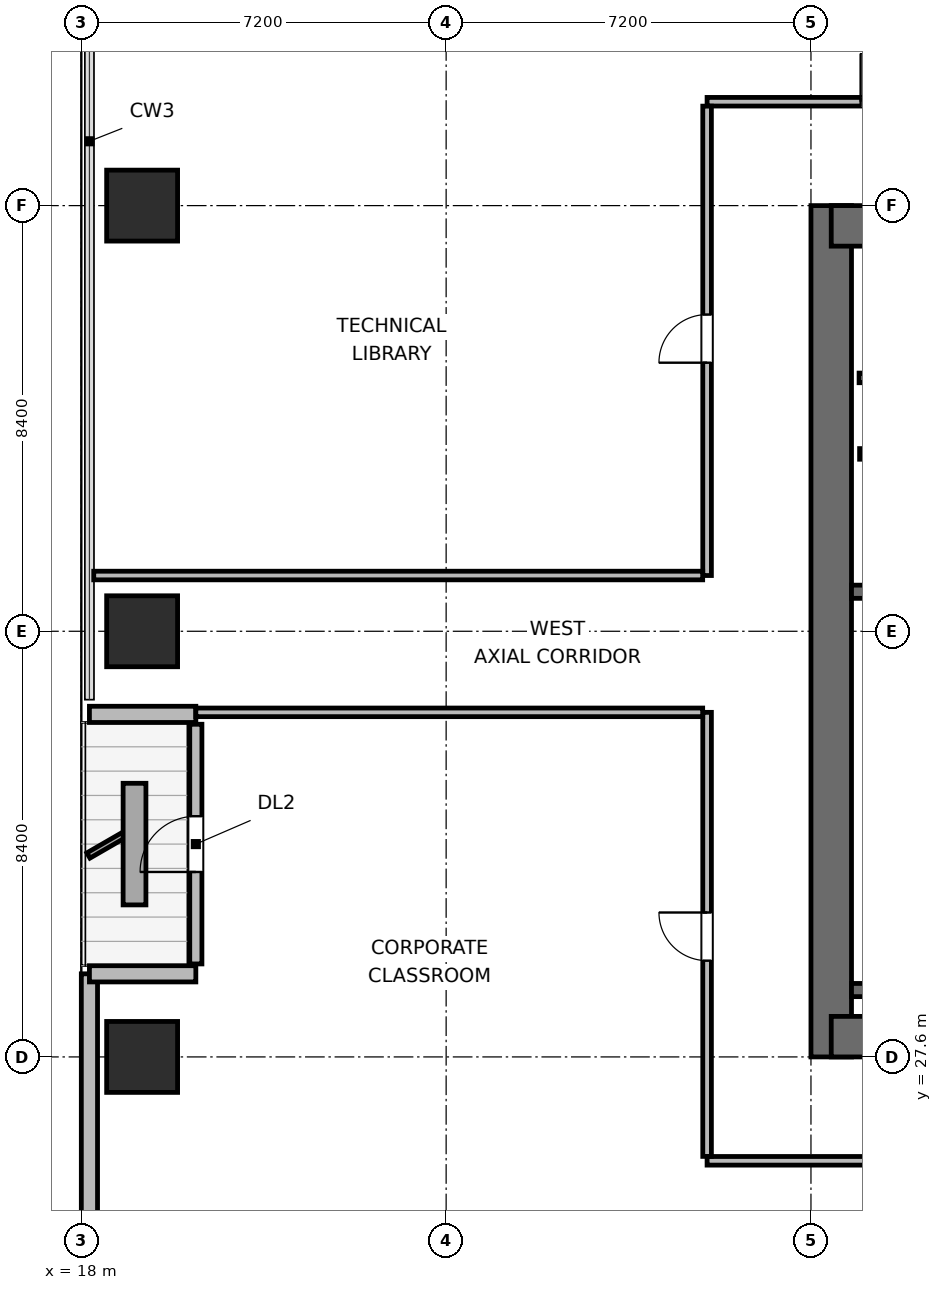
"""IFC4 building model, lengths in metres.
Left out: names, types, materials, properties, quantities, classifications, styles, units other than length and angle.
Written with IfcOpenShell. Run it as: python <this file> out.ifc"""

import sys

from ifc_helpers import new_model, si_unit, direction, frame, frame_2d, origin, origin_2d, place, context, subcontext, project, spatial, rectangle, extrude, element, fill, save


model = new_model("IFC4")
c1 = context("Model", 3, precision=1e-05, world=origin(), true_north=direction((0.0, 1.0)))
c2 = subcontext(c1, "Body", "Model", "MODEL_VIEW")
j1 = project(units=[si_unit("LENGTHUNIT", "METRE"), si_unit("PLANEANGLEUNIT", "RADIAN")], contexts=[c1])
p1 = place(None, origin())
s1 = spatial("IfcSite", under=j1, at=p1, CompositionType="ELEMENT")
p2 = place(p1, origin())
s2 = spatial("IfcBuilding", under=s1, at=p2, CompositionType="ELEMENT")
p3 = place(p2, frame((0.0, 0.0, 133.8)))
s3 = spatial("IfcBuildingStorey", under=s2, at=p3, CompositionType="ELEMENT", Elevation=133.8)
p4 = place(p3, frame((32.8, 27.6, 0.0), z_axis=(0.0, 0.0, 1.0), x_axis=(0.0, 1.0, 0.0)))
e1 = element("IfcWall", 1, at=p4, inside=s3, PredefinedType="SHEAR", context=c2, shape_type="SweptSolid", body=[
    extrude(rectangle(XDim=16.8, YDim=0.8, at=frame_2d((8.4, 0.0))), origin(), (0.0, 0.0, 1.0), 3.9),
])
p5 = place(p3, frame((32.8, 28.0, 0.0), z_axis=(0.0, 0.0, 1.0), x_axis=(1.0, 0.0, 0.0)))
e2 = element("IfcWall", 2, at=p5, inside=s3, PredefinedType="SHEAR", context=c2, shape_type="SweptSolid", body=[
    extrude(rectangle(XDim=9.2, YDim=0.8, at=frame_2d((4.6, 0.0))), origin(), (0.0, 0.0, 1.0), 3.9),
])
p6 = place(p5, frame((4.975, 0.0, 0.0)))
e3 = element("IfcOpeningElement", 3, at=p6, cuts=e2, PredefinedType="OPENING", context=c2, shape_type="SweptSolid", body=[
    extrude(rectangle(XDim=1.05, YDim=2.04, at=frame_2d((0.525, 1.02))), frame((0.0, 0.41, 0.0), z_axis=(0.0, -1.0, 0.0), x_axis=(1.0, 0.0, 0.0)), (0.0, 0.0, 1.0), 0.82),
])
p7 = place(p3, frame((32.8, 44.0, 0.0), z_axis=(0.0, 0.0, 1.0), x_axis=(1.0, 0.0, 0.0)))
e4 = element("IfcWall", 4, at=p7, inside=s3, PredefinedType="SHEAR", context=c2, shape_type="SweptSolid", body=[
    extrude(rectangle(XDim=9.2, YDim=0.8, at=frame_2d((4.6, 0.0))), origin(), (0.0, 0.0, 1.0), 3.9),
])
p8 = place(p7, frame((0.975, 0.0, 0.0)))
e5 = element("IfcOpeningElement", 5, at=p8, cuts=e4, PredefinedType="OPENING", context=c2, shape_type="SweptSolid", body=[
    extrude(rectangle(XDim=0.95, YDim=2.04, at=frame_2d((0.475, 1.02))), frame((0.0, 0.41, 0.0), z_axis=(0.0, -1.0, 0.0), x_axis=(1.0, 0.0, 0.0)), (0.0, 0.0, 1.0), 0.82),
])
p9 = place(p7, frame((4.225, 0.0, 0.0)))
e6 = element("IfcOpeningElement", 6, at=p9, cuts=e4, PredefinedType="OPENING", context=c2, shape_type="SweptSolid", body=[
    extrude(rectangle(XDim=0.9, YDim=2.02, at=frame_2d((0.45, 1.01))), frame((0.0, 0.41, 0.0), z_axis=(0.0, -1.0, 0.0), x_axis=(1.0, 0.0, 0.0)), (0.0, 0.0, 1.0), 0.82),
])
p10 = place(p7, frame((7.125, 0.0, 0.0)))
e7 = element("IfcOpeningElement", 7, at=p10, cuts=e4, PredefinedType="OPENING", context=c2, shape_type="SweptSolid", body=[
    extrude(rectangle(XDim=0.9, YDim=2.02, at=frame_2d((0.45, 1.01))), frame((0.0, 0.41, 0.0), z_axis=(0.0, -1.0, 0.0), x_axis=(1.0, 0.0, 0.0)), (0.0, 0.0, 1.0), 0.82),
])
for number, where, z_axis, x_axis in (
    (8, (33.2, 28.92, 0.0), (0.0, 0.0, 1.0), (1.0, 0.0, 0.0)),
    (9, (33.2, 36.78, 0.0), (0.0, 0.0, 1.0), (1.0, 0.0, 0.0)),
):
    element("IfcWall", number, at=place(p3, frame(where, z_axis=z_axis, x_axis=x_axis)), inside=s3, PredefinedType="SHEAR", context=c2, shape_type="SweptSolid", body=[
        extrude(rectangle(XDim=3.91, YDim=0.26, at=frame_2d((1.955, 0.0))), origin(), (0.0, 0.0, 1.0), 3.9),
    ])
for number, where, z_axis, x_axis in (
    (10, (19.2, 27.6, 0.0), (0.0, 0.0, 1.0), (1.0, 0.0, 0.0)),
    (11, (19.2, 36.0, 0.0), (0.0, 0.0, 1.0), (1.0, 0.0, 0.0)),
    (12, (19.2, 44.4, 0.0), (0.0, 0.0, 1.0), (1.0, 0.0, 0.0)),
):
    element("IfcColumn", number, at=place(p3, frame(where, z_axis=z_axis, x_axis=x_axis)), inside=s3, PredefinedType="COLUMN", context=c2, shape_type="SweptSolid", body=[
        extrude(rectangle(XDim=1.4, YDim=1.4, at=origin_2d()), origin(), (0.0, 0.0, 1.0), 3.9),
    ])
p11 = place(p3, frame((18.16, 15.021, 0.0), z_axis=(0.0, 0.0, 1.0), x_axis=(0.0, 1.0, 0.0)))
e13 = element("IfcWall", 13, at=p11, inside=s3, PredefinedType="SOLIDWALL", context=c2, shape_type="SweptSolid", body=[
    extrude(rectangle(XDim=14.219, YDim=0.32, at=frame_2d((7.109, 0.0))), origin(), (0.0, 0.0, 1.0), 3.64),
])
p12 = place(p3, frame((18.16, 29.24, 0.0), z_axis=(0.0, 0.0, 1.0), x_axis=(1.0, 0.0, 0.0)))
e14 = element("IfcWall", 14, at=p12, inside=s3, PredefinedType="SOLIDWALL", context=c2, shape_type="SweptSolid", body=[
    extrude(rectangle(XDim=2.1, YDim=0.32, at=frame_2d((1.05, 0.0))), origin(), (0.0, 0.0, 1.0), 2.875),
])
p13 = place(p3, frame((20.26, 29.435, 0.0), z_axis=(0.0, 0.0, 1.0), x_axis=(0.0, 1.0, 0.0)))
e15 = element("IfcWall", 15, at=p13, inside=s3, PredefinedType="SOLIDWALL", context=c2, shape_type="SweptSolid", body=[
    extrude(rectangle(XDim=4.73, YDim=0.24, at=frame_2d((2.365, 0.0))), origin(), (0.0, 0.0, 1.0), 3.162),
])
p14 = place(p13, frame((1.815, 0.0, 0.0)))
e16 = element("IfcOpeningElement", 16, at=p14, cuts=e15, PredefinedType="OPENING", context=c2, shape_type="SweptSolid", body=[
    extrude(rectangle(XDim=1.1, YDim=2.04, at=frame_2d((0.55, 1.02))), frame((0.0, 0.13, 0.0), z_axis=(0.0, -1.0, 0.0), x_axis=(1.0, 0.0, 0.0)), (0.0, 0.0, 1.0), 0.26),
])
p15 = place(p3, frame((20.26, 34.36, 0.0), z_axis=(0.0, 0.0, 1.0), x_axis=(-1.0, 0.0, 0.0)))
e17 = element("IfcWall", 17, at=p15, inside=s3, PredefinedType="SOLIDWALL", context=c2, shape_type="SweptSolid", body=[
    extrude(rectangle(XDim=2.1, YDim=0.32, at=frame_2d((1.05, 0.0))), origin(), (0.0, 0.0, 1.0), 2.875),
])
p16 = place(p3, frame((33.35, 41.0, 0.0), z_axis=(0.0, 0.0, 1.0), x_axis=(1.0, 0.0, 0.0)))
e18 = element("IfcWall", 18, at=p16, inside=s3, PredefinedType="PLUMBINGWALL", context=c2, shape_type="SweptSolid", body=[
    extrude(rectangle(XDim=8.1, YDim=0.19, at=frame_2d((4.05, 0.0))), origin(), (0.0, 0.0, 1.0), 3.64),
])
p17 = place(p3, frame((33.36, 39.5, 0.0), z_axis=(0.0, 0.0, 1.0), x_axis=(1.0, 0.0, 0.0)))
e19 = element("IfcWall", 19, at=p17, inside=s3, PredefinedType="PARTITIONING", context=c2, shape_type="SweptSolid", body=[
    extrude(rectangle(XDim=1.86, YDim=0.21, at=frame_2d((0.93, 0.0))), origin(), (0.0, 0.0, 1.0), 3.64),
])
p18 = place(p3, frame((30.35, 25.55, 0.0), z_axis=(0.0, 0.0, 1.0), x_axis=(1.0, 0.0, 0.0)))
e20 = element("IfcWall", 20, at=p18, inside=s3, PredefinedType="PARTITIONING", context=c2, shape_type="SweptSolid", body=[
    extrude(rectangle(XDim=33.25, YDim=0.17, at=frame_2d((16.625, 0.0))), origin(), (0.0, 0.0, 1.0), 3.64),
])
p19 = place(p18, frame((3.21, 0.0, 0.0)))
e21 = element("IfcOpeningElement", 21, at=p19, cuts=e20, PredefinedType="OPENING", context=c2, shape_type="SweptSolid", body=[
    extrude(rectangle(XDim=0.95, YDim=2.04, at=frame_2d((0.475, 1.02))), frame((0.0, 0.095, 0.0), z_axis=(0.0, -1.0, 0.0), x_axis=(1.0, 0.0, 0.0)), (0.0, 0.0, 1.0), 0.19),
])
p20 = place(p18, frame((9.98, 0.0, 0.0)))
e22 = element("IfcOpeningElement", 22, at=p20, cuts=e20, PredefinedType="OPENING", context=c2, shape_type="SweptSolid", body=[
    extrude(rectangle(XDim=0.95, YDim=2.04, at=frame_2d((0.475, 1.02))), frame((0.0, 0.095, 0.0), z_axis=(0.0, -1.0, 0.0), x_axis=(1.0, 0.0, 0.0)), (0.0, 0.0, 1.0), 0.19),
])
p21 = place(p18, frame((16.15, 0.0, 0.0)))
e23 = element("IfcOpeningElement", 23, at=p21, cuts=e20, PredefinedType="OPENING", context=c2, shape_type="SweptSolid", body=[
    extrude(rectangle(XDim=0.95, YDim=2.04, at=frame_2d((0.475, 1.02))), frame((0.0, 0.095, 0.0), z_axis=(0.0, -1.0, 0.0), x_axis=(1.0, 0.0, 0.0)), (0.0, 0.0, 1.0), 0.19),
])
p22 = place(p18, frame((22.32, 0.0, 0.0)))
e24 = element("IfcOpeningElement", 24, at=p22, cuts=e20, PredefinedType="OPENING", context=c2, shape_type="SweptSolid", body=[
    extrude(rectangle(XDim=0.95, YDim=2.04, at=frame_2d((0.475, 1.02))), frame((0.0, 0.095, 0.0), z_axis=(0.0, -1.0, 0.0), x_axis=(1.0, 0.0, 0.0)), (0.0, 0.0, 1.0), 0.19),
])
p23 = place(p18, frame((29.09, 0.0, 0.0)))
e25 = element("IfcOpeningElement", 25, at=p23, cuts=e20, PredefinedType="OPENING", context=c2, shape_type="SweptSolid", body=[
    extrude(rectangle(XDim=0.95, YDim=2.04, at=frame_2d((0.475, 1.02))), frame((0.0, 0.095, 0.0), z_axis=(0.0, -1.0, 0.0), x_axis=(1.0, 0.0, 0.0)), (0.0, 0.0, 1.0), 0.19),
])
p24 = place(p3, frame((30.35, 46.45, 0.0), z_axis=(0.0, 0.0, 1.0), x_axis=(1.0, 0.0, 0.0)))
e26 = element("IfcWall", 26, at=p24, inside=s3, PredefinedType="PARTITIONING", context=c2, shape_type="SweptSolid", body=[
    extrude(rectangle(XDim=33.25, YDim=0.17, at=frame_2d((16.625, 0.0))), origin(), (0.0, 0.0, 1.0), 3.64),
])
p25 = place(p24, frame((3.03, 0.0, 0.0)))
e27 = element("IfcOpeningElement", 27, at=p25, cuts=e26, PredefinedType="OPENING", context=c2, shape_type="SweptSolid", body=[
    extrude(rectangle(XDim=0.95, YDim=2.04, at=frame_2d((0.475, 1.02))), frame((0.0, 0.095, 0.0), z_axis=(0.0, -1.0, 0.0), x_axis=(1.0, 0.0, 0.0)), (0.0, 0.0, 1.0), 0.19),
])
p26 = place(p24, frame((10.09, 0.0, 0.0)))
e28 = element("IfcOpeningElement", 28, at=p26, cuts=e26, PredefinedType="OPENING", context=c2, shape_type="SweptSolid", body=[
    extrude(rectangle(XDim=0.95, YDim=2.04, at=frame_2d((0.475, 1.02))), frame((0.0, 0.095, 0.0), z_axis=(0.0, -1.0, 0.0), x_axis=(1.0, 0.0, 0.0)), (0.0, 0.0, 1.0), 0.19),
])
p27 = place(p24, frame((15.1, 0.0, 0.0)))
e29 = element("IfcOpeningElement", 29, at=p27, cuts=e26, PredefinedType="OPENING", context=c2, shape_type="SweptSolid", body=[
    extrude(rectangle(XDim=0.95, YDim=2.04, at=frame_2d((0.475, 1.02))), frame((0.0, 0.095, 0.0), z_axis=(0.0, -1.0, 0.0), x_axis=(1.0, 0.0, 0.0)), (0.0, 0.0, 1.0), 0.19),
])
p28 = place(p24, frame((21.16, 0.0, 0.0)))
e30 = element("IfcOpeningElement", 30, at=p28, cuts=e26, PredefinedType="OPENING", context=c2, shape_type="SweptSolid", body=[
    extrude(rectangle(XDim=0.95, YDim=2.04, at=frame_2d((0.475, 1.02))), frame((0.0, 0.095, 0.0), z_axis=(0.0, -1.0, 0.0), x_axis=(1.0, 0.0, 0.0)), (0.0, 0.0, 1.0), 0.19),
])
p29 = place(p24, frame((29.27, 0.0, 0.0)))
e31 = element("IfcOpeningElement", 31, at=p29, cuts=e26, PredefinedType="OPENING", context=c2, shape_type="SweptSolid", body=[
    extrude(rectangle(XDim=0.95, YDim=2.04, at=frame_2d((0.475, 1.02))), frame((0.0, 0.095, 0.0), z_axis=(0.0, -1.0, 0.0), x_axis=(1.0, 0.0, 0.0)), (0.0, 0.0, 1.0), 0.19),
])
p30 = place(p3, frame((30.35, 25.637, 0.0), z_axis=(0.0, 0.0, 1.0), x_axis=(0.0, 1.0, 0.0)))
e32 = element("IfcWall", 32, at=p30, inside=s3, PredefinedType="PARTITIONING", context=c2, shape_type="SweptSolid", body=[
    extrude(rectangle(XDim=8.763, YDim=0.17, at=frame_2d((4.381, 0.0))), origin(), (0.0, 0.0, 1.0), 3.64),
])
p31 = place(p30, frame((3.863, 0.0, 0.0)))
e33 = element("IfcOpeningElement", 33, at=p31, cuts=e32, PredefinedType="OPENING", context=c2, shape_type="SweptSolid", body=[
    extrude(rectangle(XDim=0.95, YDim=2.04, at=frame_2d((0.475, 1.02))), frame((0.0, 0.095, 0.0), z_axis=(0.0, -1.0, 0.0), x_axis=(1.0, 0.0, 0.0)), (0.0, 0.0, 1.0), 0.19),
])
p32 = place(p3, frame((30.35, 37.1, 0.0), z_axis=(0.0, 0.0, 1.0), x_axis=(0.0, 1.0, 0.0)))
e34 = element("IfcWall", 34, at=p32, inside=s3, PredefinedType="PARTITIONING", context=c2, shape_type="SweptSolid", body=[
    extrude(rectangle(XDim=9.263, YDim=0.17, at=frame_2d((4.631, 0.0))), origin(), (0.0, 0.0, 1.0), 3.64),
])
p33 = place(p32, frame((4.2, 0.0, 0.0)))
e35 = element("IfcOpeningElement", 35, at=p33, cuts=e34, PredefinedType="OPENING", context=c2, shape_type="SweptSolid", body=[
    extrude(rectangle(XDim=0.95, YDim=2.04, at=frame_2d((0.475, 1.02))), frame((0.0, 0.095, 0.0), z_axis=(0.0, -1.0, 0.0), x_axis=(1.0, 0.0, 0.0)), (0.0, 0.0, 1.0), 0.19),
])
p34 = place(p3, frame((20.26, 34.4, 0.0), z_axis=(0.0, 0.0, 1.0), x_axis=(1.0, 0.0, 0.0)))
e36 = element("IfcWall", 36, at=p34, inside=s3, PredefinedType="PARTITIONING", context=c2, shape_type="SweptSolid", body=[
    extrude(rectangle(XDim=10.003, YDim=0.17, at=frame_2d((5.001, 0.0))), origin(), (0.0, 0.0, 1.0), 3.64),
])
p35 = place(p3, frame((18.245, 37.1, 0.0), z_axis=(0.0, 0.0, 1.0), x_axis=(1.0, 0.0, 0.0)))
e37 = element("IfcWall", 37, at=p35, inside=s3, PredefinedType="PARTITIONING", context=c2, shape_type="SweptSolid", body=[
    extrude(rectangle(XDim=12.018, YDim=0.17, at=frame_2d((6.009, 0.0))), origin(), (0.0, 0.0, 1.0), 3.64),
])
p36 = place(p14, origin())
e38 = element("IfcDoor", 38, at=p36, inside=s3, OperationType="SINGLE_SWING_LEFT", PredefinedType="DOOR", context=c2, shape_type="SweptSolid", body=[
    extrude(rectangle(XDim=1.1, YDim=2.04, at=frame_2d((0.55, 1.02))), frame((0.0, 0.025, 0.0), z_axis=(0.0, -1.0, 0.0), x_axis=(1.0, 0.0, 0.0)), (0.0, 0.0, 1.0), 0.05),
])
fill(e16, e38)
p37 = place(p25, origin())
e39 = element("IfcDoor", 39, at=p37, inside=s3, OperationType="SINGLE_SWING_LEFT", PredefinedType="DOOR", context=c2, shape_type="SweptSolid", body=[
    extrude(rectangle(XDim=0.95, YDim=2.04, at=frame_2d((0.475, 1.02))), frame((0.0, 0.025, 0.0), z_axis=(0.0, -1.0, 0.0), x_axis=(1.0, 0.0, 0.0)), (0.0, 0.0, 1.0), 0.05),
])
fill(e27, e39)
p38 = place(p31, origin())
e40 = element("IfcDoor", 40, at=p38, inside=s3, OperationType="SINGLE_SWING_RIGHT", PredefinedType="DOOR", context=c2, shape_type="SweptSolid", body=[
    extrude(rectangle(XDim=0.95, YDim=2.04, at=frame_2d((0.475, 1.02))), frame((0.0, 0.025, 0.0), z_axis=(0.0, -1.0, 0.0), x_axis=(1.0, 0.0, 0.0)), (0.0, 0.0, 1.0), 0.05),
])
fill(e33, e40)
p39 = place(p33, origin())
e41 = element("IfcDoor", 41, at=p39, inside=s3, OperationType="SINGLE_SWING_LEFT", PredefinedType="DOOR", context=c2, shape_type="SweptSolid", body=[
    extrude(rectangle(XDim=0.95, YDim=2.04, at=frame_2d((0.475, 1.02))), frame((0.0, 0.025, 0.0), z_axis=(0.0, -1.0, 0.0), x_axis=(1.0, 0.0, 0.0)), (0.0, 0.0, 1.0), 0.05),
])
fill(e35, e41)
save(model, sys.argv[1])
